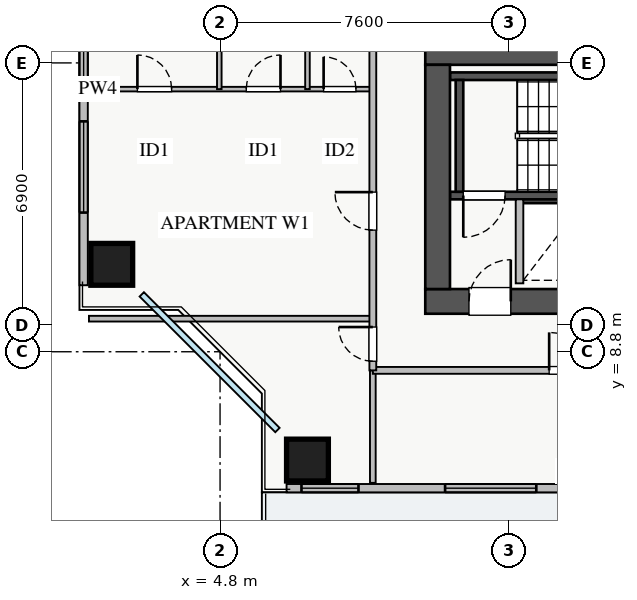
"""IFC4 building model, lengths in metres.
Left out: names, types, materials, properties, quantities, classifications, styles, units other than length and angle.
Written with IfcOpenShell. Run it as: python <this file> out.ifc"""

import sys

from ifc_helpers import new_model, si_unit, direction, frame, frame_2d, origin, origin_2d, place, context, subcontext, project, spatial, rectangle, extrude, source, transform, mapped, element, fill, save


model = new_model("IFC4")
c1 = context("Model", 3, precision=1e-05, world=origin(), true_north=direction((0.0, 1.0)))
c2 = subcontext(c1, "Body", "Model", "MODEL_VIEW")
j1 = project(units=[si_unit("LENGTHUNIT", "METRE"), si_unit("PLANEANGLEUNIT", "RADIAN")], contexts=[c1])
p1 = place(None, origin())
s1 = spatial("IfcSite", under=j1, at=p1, CompositionType="ELEMENT")
p2 = place(p1, origin())
s2 = spatial("IfcBuilding", under=s1, at=p2, CompositionType="ELEMENT")
p3 = place(p2, frame((0.0, 0.0, 97.0)))
s3 = spatial("IfcBuildingStorey", under=s2, at=p3, CompositionType="ELEMENT", Elevation=97.0)
p4 = place(p3, frame((12.68, 12.8, 0.0), z_axis=(0.0, 0.0, 1.0), x_axis=(1.0, 0.0, 0.0)))
e1 = element("IfcWall", 1, at=p4, inside=s3, PredefinedType="SHEAR", context=c2, shape_type="SweptSolid", body=[
    extrude(rectangle(XDim=1.94, YDim=0.18, at=frame_2d((0.97, 0.0))), origin(), (0.0, 0.0, 1.0), 3.07),
])
p5 = place(p3, frame((10.85, 12.91, 0.0), z_axis=(0.0, 0.0, 1.0), x_axis=(1.0, 0.0, 0.0)))
e2 = element("IfcWall", 2, at=p5, inside=s3, PredefinedType="SHEAR", context=c2, shape_type="SweptSolid", body=[
    extrude(rectangle(XDim=7.3, YDim=0.2, at=frame_2d((3.65, 0.0))), origin(), (0.0, 0.0, 1.0), 3.25),
])
p6 = place(p5, frame((0.35, 0.0, 0.0)))
e3 = element("IfcOpeningElement", 3, at=p6, cuts=e2, PredefinedType="OPENING", context=c2, shape_type="SweptSolid", body=[
    extrude(rectangle(XDim=1.1, YDim=2.05, at=frame_2d((0.55, 1.025))), frame((0.0, 0.11, 0.0), z_axis=(0.0, -1.0, 0.0), x_axis=(1.0, 0.0, 0.0)), (0.0, 0.0, 1.0), 0.22),
])
p7 = place(p3, frame((10.85, 16.05, 0.0), z_axis=(0.0, 0.0, 1.0), x_axis=(1.0, 0.0, 0.0)))
e4 = element("IfcWall", 4, at=p7, inside=s3, PredefinedType="SHEAR", context=c2, shape_type="SweptSolid", body=[
    extrude(rectangle(XDim=7.3, YDim=0.2, at=frame_2d((3.65, 0.0))), origin(), (0.0, 0.0, 1.0), 3.25),
])
p8 = place(p3, frame((11.1, 13.01, 0.0), z_axis=(0.0, 0.0, 1.0), x_axis=(0.0, 1.0, 0.0)))
e5 = element("IfcWall", 5, at=p8, inside=s3, PredefinedType="SHEAR", context=c2, shape_type="SweptSolid", body=[
    extrude(rectangle(XDim=2.94, YDim=0.2, at=frame_2d((1.47, 0.0))), origin(), (0.0, 0.0, 1.0), 3.25),
])
p9 = place(p3, frame((10.2, 10.125, 0.0), z_axis=(0.0, 0.0, 1.0), x_axis=(1.0, 0.0, 0.0)))
e6 = element("IfcWall", 6, at=p9, inside=s3, PredefinedType="SHEAR", context=c2, shape_type="SweptSolid", body=[
    extrude(rectangle(XDim=17.6, YDim=0.65, at=frame_2d((8.8, 0.0))), origin(), (0.0, 0.0, 1.0), 3.25),
])
p10 = place(p9, frame((1.15, 0.0, 0.0)))
e7 = element("IfcOpeningElement", 7, at=p10, cuts=e6, PredefinedType="OPENING", context=c2, shape_type="SweptSolid", body=[
    extrude(rectangle(XDim=1.1, YDim=2.05, at=frame_2d((0.55, 1.025))), frame((0.0, 0.335, 0.0), z_axis=(0.0, -1.0, 0.0), x_axis=(1.0, 0.0, 0.0)), (0.0, 0.0, 1.0), 0.67),
])
p11 = place(p9, frame((8.3, 0.0, 0.0)))
e8 = element("IfcOpeningElement", 8, at=p11, cuts=e6, PredefinedType="OPENING", context=c2, shape_type="SweptSolid", body=[
    extrude(rectangle(XDim=1.1, YDim=2.05, at=frame_2d((0.55, 1.025))), frame((0.0, 0.335, 0.0), z_axis=(0.0, -1.0, 0.0), x_axis=(1.0, 0.0, 0.0)), (0.0, 0.0, 1.0), 0.67),
])
p12 = place(p9, frame((4.9, 0.0, 0.0)))
e9 = element("IfcOpeningElement", 9, at=p12, cuts=e6, PredefinedType="OPENING", context=c2, shape_type="SweptSolid", body=[
    extrude(rectangle(XDim=1.1, YDim=2.05, at=frame_2d((0.55, 1.025))), frame((0.0, 0.335, 0.0), z_axis=(0.0, -1.0, 0.0), x_axis=(1.0, 0.0, 0.0)), (0.0, 0.0, 1.0), 0.67),
])
p13 = place(p9, frame((14.74, 0.0, 0.0)))
e10 = element("IfcOpeningElement", 10, at=p13, cuts=e6, PredefinedType="OPENING", context=c2, shape_type="SweptSolid", body=[
    extrude(rectangle(XDim=1.0, YDim=2.05, at=frame_2d((0.5, 1.025))), frame((0.0, 0.335, 0.0), z_axis=(0.0, -1.0, 0.0), x_axis=(1.0, 0.0, 0.0)), (0.0, 0.0, 1.0), 0.67),
])
p14 = place(p9, frame((11.67, 0.0, 0.0)))
e11 = element("IfcOpeningElement", 11, at=p14, cuts=e6, PredefinedType="OPENING", context=c2, shape_type="SweptSolid", body=[
    extrude(rectangle(XDim=1.0, YDim=2.05, at=frame_2d((0.5, 1.025))), frame((0.0, 0.335, 0.0), z_axis=(0.0, -1.0, 0.0), x_axis=(1.0, 0.0, 0.0)), (0.0, 0.0, 1.0), 0.67),
])
p15 = place(p3, frame((10.2, 16.675, 0.0), z_axis=(0.0, 0.0, 1.0), x_axis=(1.0, 0.0, 0.0)))
e12 = element("IfcWall", 12, at=p15, inside=s3, PredefinedType="SHEAR", context=c2, shape_type="SweptSolid", body=[
    extrude(rectangle(XDim=17.6, YDim=0.65, at=frame_2d((8.8, 0.0))), origin(), (0.0, 0.0, 1.0), 3.25),
])
p16 = place(p3, frame((10.525, 10.45, 0.0), z_axis=(0.0, 0.0, 1.0), x_axis=(0.0, 1.0, 0.0)))
e13 = element("IfcWall", 13, at=p16, inside=s3, PredefinedType="SHEAR", context=c2, shape_type="SweptSolid", body=[
    extrude(rectangle(XDim=5.9, YDim=0.65, at=frame_2d((2.95, 0.0))), origin(), (0.0, 0.0, 1.0), 3.25),
])
m1 = source(origin(), c2, "Body", "SweptSolid", [
    extrude(rectangle(XDim=1.1, YDim=1.1, at=origin_2d()), origin(), (0.0, 0.0, 1.0), 3.25),
])
for number, where, z_axis, x_axis in (
    (14, (7.1, 5.95, 0.0), (0.0, 0.0, 1.0), (1.0, 0.0, 0.0)),
    (15, (1.95, 11.1, 0.0), (0.0, 0.0, 1.0), (1.0, 0.0, 0.0)),
):
    element("IfcColumn", number, at=place(p3, frame(where, z_axis=z_axis, x_axis=x_axis)), inside=s3, PredefinedType="COLUMN", context=c2, shape_type="MappedRepresentation", body=[
        mapped(m1, transform((0.0, 0.0, 0.0), x_axis=(1.0, 0.0, 0.0), y_axis=(0.0, 1.0, 0.0), z_axis=(0.0, 0.0, 1.0), scale=1.0)),
    ])
p17 = place(p3, frame((6.55, 5.21, 0.0), z_axis=(0.0, 0.0, 1.0), x_axis=(1.0, 0.0, 0.0)))
e16 = element("IfcWall", 16, at=p17, inside=s3, PredefinedType="STANDARD", context=c2, shape_type="SweptSolid", body=[
    extrude(rectangle(XDim=24.9, YDim=0.22, at=frame_2d((12.45, 0.0))), origin(), (0.0, 0.0, 1.0), 2.61),
])
p18 = place(p17, frame((13.3, 0.0, 0.0)))
e17 = element("IfcOpeningElement", 17, at=p18, cuts=e16, PredefinedType="OPENING", context=c2, shape_type="SweptSolid", body=[
    extrude(rectangle(XDim=1.2, YDim=2.1, at=frame_2d((0.6, 1.05))), frame((0.0, 0.12, 0.0), z_axis=(0.0, -1.0, 0.0), x_axis=(1.0, 0.0, 0.0)), (0.0, 0.0, 1.0), 0.24),
])
p19 = place(p17, frame((0.393, 0.0, 0.9)))
e18 = element("IfcOpeningElement", 18, at=p19, cuts=e16, PredefinedType="OPENING", context=c2, shape_type="SweptSolid", body=[
    extrude(rectangle(XDim=1.5, YDim=1.5, at=frame_2d((0.75, 0.75))), frame((0.0, 0.12, 0.0), z_axis=(0.0, -1.0, 0.0), x_axis=(1.0, 0.0, 0.0)), (0.0, 0.0, 1.0), 0.24),
])
p20 = place(p17, frame((8.438, 0.0, 0.9)))
e19 = element("IfcOpeningElement", 19, at=p20, cuts=e16, PredefinedType="OPENING", context=c2, shape_type="SweptSolid", body=[
    extrude(rectangle(XDim=1.8, YDim=1.45, at=frame_2d((0.9, 0.725))), frame((0.0, 0.12, 0.0), z_axis=(0.0, -1.0, 0.0), x_axis=(1.0, 0.0, 0.0)), (0.0, 0.0, 1.0), 0.24),
])
p21 = place(p17, frame((14.813, 0.0, 0.9)))
e20 = element("IfcOpeningElement", 20, at=p21, cuts=e16, PredefinedType="OPENING", context=c2, shape_type="SweptSolid", body=[
    extrude(rectangle(XDim=1.5, YDim=1.45, at=frame_2d((0.75, 0.725))), frame((0.0, 0.12, 0.0), z_axis=(0.0, -1.0, 0.0), x_axis=(1.0, 0.0, 0.0)), (0.0, 0.0, 1.0), 0.24),
])
p22 = place(p17, frame((20.738, 0.0, 0.9)))
e21 = element("IfcOpeningElement", 21, at=p22, cuts=e16, PredefinedType="OPENING", context=c2, shape_type="SweptSolid", body=[
    extrude(rectangle(XDim=2.1, YDim=1.48, at=frame_2d((1.05, 0.74))), frame((0.0, 0.12, 0.0), z_axis=(0.0, -1.0, 0.0), x_axis=(1.0, 0.0, 0.0)), (0.0, 0.0, 1.0), 0.24),
])
p23 = place(p17, frame((4.171, 0.0, 0.9)))
e22 = element("IfcOpeningElement", 22, at=p23, cuts=e16, PredefinedType="OPENING", context=c2, shape_type="SweptSolid", body=[
    extrude(rectangle(XDim=2.4, YDim=1.5, at=frame_2d((1.2, 0.75))), frame((0.0, 0.12, 0.0), z_axis=(0.0, -1.0, 0.0), x_axis=(1.0, 0.0, 0.0)), (0.0, 0.0, 1.0), 0.24),
])
p24 = place(p3, frame((1.21, 10.55, 0.0), z_axis=(0.0, 0.0, 1.0), x_axis=(0.0, 1.0, 0.0)))
e23 = element("IfcWall", 23, at=p24, inside=s3, PredefinedType="STANDARD", context=c2, shape_type="SweptSolid", body=[
    extrude(rectangle(XDim=24.9, YDim=0.22, at=frame_2d((12.45, 0.0))), origin(), (0.0, 0.0, 1.0), 2.61),
])
p25 = place(p24, frame((13.3, 0.0, 0.0)))
e24 = element("IfcOpeningElement", 24, at=p25, cuts=e23, PredefinedType="OPENING", context=c2, shape_type="SweptSolid", body=[
    extrude(rectangle(XDim=1.2, YDim=2.1, at=frame_2d((0.6, 1.05))), frame((0.0, 0.12, 0.0), z_axis=(0.0, -1.0, 0.0), x_axis=(1.0, 0.0, 0.0)), (0.0, 0.0, 1.0), 0.24),
])
p26 = place(p24, frame((1.912, 0.0, 0.9)))
e25 = element("IfcOpeningElement", 25, at=p26, cuts=e23, PredefinedType="OPENING", context=c2, shape_type="SweptSolid", body=[
    extrude(rectangle(XDim=2.4, YDim=1.48, at=frame_2d((1.2, 0.74))), frame((0.0, 0.12, 0.0), z_axis=(0.0, -1.0, 0.0), x_axis=(1.0, 0.0, 0.0)), (0.0, 0.0, 1.0), 0.24),
])
p27 = place(p24, frame((20.737, 0.0, 0.9)))
e26 = element("IfcOpeningElement", 26, at=p27, cuts=e23, PredefinedType="OPENING", context=c2, shape_type="SweptSolid", body=[
    extrude(rectangle(XDim=2.1, YDim=1.48, at=frame_2d((1.05, 0.74))), frame((0.0, 0.12, 0.0), z_axis=(0.0, -1.0, 0.0), x_axis=(1.0, 0.0, 0.0)), (0.0, 0.0, 1.0), 0.24),
])
p28 = place(p24, frame((5.38, 0.0, 0.9)))
e27 = element("IfcOpeningElement", 27, at=p28, cuts=e23, PredefinedType="OPENING", context=c2, shape_type="SweptSolid", body=[
    extrude(rectangle(XDim=0.9, YDim=1.2, at=frame_2d((0.45, 0.6))), frame((0.0, 0.12, 0.0), z_axis=(0.0, -1.0, 0.0), x_axis=(1.0, 0.0, 0.0)), (0.0, 0.0, 1.0), 0.24),
])
p29 = place(p3, frame((12.68, 10.6, 0.0), z_axis=(0.0, 0.0, 1.0), x_axis=(0.0, 1.0, 0.0)))
e28 = element("IfcWall", 28, at=p29, inside=s3, PredefinedType="PARTITIONING", context=c2, shape_type="SweptSolid", body=[
    extrude(rectangle(XDim=2.21, YDim=0.2, at=frame_2d((1.105, 0.0))), origin(), (0.0, 0.0, 1.0), 3.07),
])
p30 = place(p3, frame((8.82, 5.35, 0.0), z_axis=(0.0, 0.0, 1.0), x_axis=(0.0, 1.0, 0.0)))
e29 = element("IfcWall", 29, at=p30, inside=s3, PredefinedType="PARTITIONING", context=c2, shape_type="SweptSolid", body=[
    extrude(rectangle(XDim=2.96, YDim=0.15, at=frame_2d((1.48, 0.0))), origin(), (0.0, 0.0, 1.0), 3.07),
])
p31 = place(p3, frame((8.82, 8.31, 0.0), z_axis=(0.0, 0.0, 1.0), x_axis=(1.0, 0.0, 0.0)))
e30 = element("IfcWall", 30, at=p31, inside=s3, PredefinedType="PARTITIONING", context=c2, shape_type="SweptSolid", body=[
    extrude(rectangle(XDim=23.58, YDim=0.18, at=frame_2d((11.79, 0.0))), origin(), (0.0, 0.0, 1.0), 3.07),
])
p32 = place(p31, frame((4.64, 0.0, 0.0)))
e31 = element("IfcOpeningElement", 31, at=p32, cuts=e30, PredefinedType="OPENING", context=c2, shape_type="SweptSolid", body=[
    extrude(rectangle(XDim=1.0, YDim=2.05, at=frame_2d((0.5, 1.025))), frame((0.0, 0.1, 0.0), z_axis=(0.0, -1.0, 0.0), x_axis=(1.0, 0.0, 0.0)), (0.0, 0.0, 1.0), 0.2),
])
p33 = place(p31, frame((16.22, 0.0, 0.0)))
e32 = element("IfcOpeningElement", 32, at=p33, cuts=e30, PredefinedType="OPENING", context=c2, shape_type="SweptSolid", body=[
    extrude(rectangle(XDim=1.0, YDim=2.05, at=frame_2d((0.5, 1.025))), frame((0.0, 0.1, 0.0), z_axis=(0.0, -1.0, 0.0), x_axis=(1.0, 0.0, 0.0)), (0.0, 0.0, 1.0), 0.2),
])
p34 = place(p3, frame((1.35, 9.67, 0.0), z_axis=(0.0, 0.0, 1.0), x_axis=(1.0, 0.0, 0.0)))
e33 = element("IfcWall", 33, at=p34, inside=s3, PredefinedType="PARTITIONING", context=c2, shape_type="SweptSolid", body=[
    extrude(rectangle(XDim=7.47, YDim=0.15, at=frame_2d((3.735, 0.0))), origin(), (0.0, 0.0, 1.0), 3.07),
])
p35 = place(p3, frame((1.35, 15.71, 0.0), z_axis=(0.0, 0.0, 1.0), x_axis=(1.0, 0.0, 0.0)))
e34 = element("IfcWall", 34, at=p35, inside=s3, PredefinedType="PLUMBINGWALL", context=c2, shape_type="SweptSolid", body=[
    extrude(rectangle(XDim=7.47, YDim=0.12, at=frame_2d((3.735, 0.0))), origin(), (0.0, 0.0, 1.0), 3.07),
])
p36 = place(p35, frame((1.275, 0.0, 0.0)))
e35 = element("IfcOpeningElement", 35, at=p36, cuts=e34, PredefinedType="OPENING", context=c2, shape_type="SweptSolid", body=[
    extrude(rectangle(XDim=0.9, YDim=2.05, at=frame_2d((0.45, 1.025))), frame((0.0, 0.07, 0.0), z_axis=(0.0, -1.0, 0.0), x_axis=(1.0, 0.0, 0.0)), (0.0, 0.0, 1.0), 0.14),
])
p37 = place(p35, frame((4.14, 0.0, 0.0)))
e36 = element("IfcOpeningElement", 36, at=p37, cuts=e34, PredefinedType="OPENING", context=c2, shape_type="SweptSolid", body=[
    extrude(rectangle(XDim=0.9, YDim=2.05, at=frame_2d((0.45, 1.025))), frame((0.0, 0.07, 0.0), z_axis=(0.0, -1.0, 0.0), x_axis=(1.0, 0.0, 0.0)), (0.0, 0.0, 1.0), 0.14),
])
p38 = place(p35, frame((6.175, 0.0, 0.0)))
e37 = element("IfcOpeningElement", 37, at=p38, cuts=e34, PredefinedType="OPENING", context=c2, shape_type="SweptSolid", body=[
    extrude(rectangle(XDim=0.85, YDim=2.05, at=frame_2d((0.425, 1.025))), frame((0.0, 0.07, 0.0), z_axis=(0.0, -1.0, 0.0), x_axis=(1.0, 0.0, 0.0)), (0.0, 0.0, 1.0), 0.14),
])
for number, where, z_axis, x_axis in (
    (38, (4.78, 15.71, 0.0), (0.0, 0.0, 1.0), (0.0, 1.0, 0.0)),
    (39, (7.1, 15.71, 0.0), (0.0, 0.0, 1.0), (0.0, 1.0, 0.0)),
):
    element("IfcWall", number, at=place(p3, frame(where, z_axis=z_axis, x_axis=x_axis)), inside=s3, PredefinedType="PLUMBINGWALL", context=c2, shape_type="SweptSolid", body=[
        extrude(rectangle(XDim=6.54, YDim=0.12, at=frame_2d((3.27, 0.0))), origin(), (0.0, 0.0, 1.0), 3.07),
    ])
p39 = place(p3, frame((8.82, 8.31, 0.0), z_axis=(0.0, 0.0, 1.0), x_axis=(0.0, 1.0, 0.0)))
e40 = element("IfcWall", 40, at=p39, inside=s3, PredefinedType="PARTITIONING", context=c2, shape_type="SweptSolid", body=[
    extrude(rectangle(XDim=29.13, YDim=0.18, at=frame_2d((14.565, 0.0))), origin(), (0.0, 0.0, 1.0), 3.07),
])
p40 = place(p39, frame((27.94, 0.0, 0.0)))
e41 = element("IfcOpeningElement", 41, at=p40, cuts=e40, PredefinedType="OPENING", context=c2, shape_type="SweptSolid", body=[
    extrude(rectangle(XDim=0.9, YDim=2.05, at=frame_2d((0.45, 1.025))), frame((0.0, 0.1, 0.0), z_axis=(0.0, -1.0, 0.0), x_axis=(1.0, 0.0, 0.0)), (0.0, 0.0, 1.0), 0.2),
])
p41 = place(p39, frame((0.24, 0.0, 0.0)))
e42 = element("IfcOpeningElement", 42, at=p41, cuts=e40, PredefinedType="OPENING", context=c2, shape_type="SweptSolid", body=[
    extrude(rectangle(XDim=0.9, YDim=2.05, at=frame_2d((0.45, 1.025))), frame((0.0, 0.1, 0.0), z_axis=(0.0, -1.0, 0.0), x_axis=(1.0, 0.0, 0.0)), (0.0, 0.0, 1.0), 0.2),
])
p42 = place(p39, frame((3.69, 0.0, 0.0)))
e43 = element("IfcOpeningElement", 43, at=p42, cuts=e40, PredefinedType="OPENING", context=c2, shape_type="SweptSolid", body=[
    extrude(rectangle(XDim=1.0, YDim=2.05, at=frame_2d((0.5, 1.025))), frame((0.0, 0.1, 0.0), z_axis=(0.0, -1.0, 0.0), x_axis=(1.0, 0.0, 0.0)), (0.0, 0.0, 1.0), 0.2),
])
p43 = place(p39, frame((20.305, 0.0, 0.0)))
e44 = element("IfcOpeningElement", 44, at=p43, cuts=e40, PredefinedType="OPENING", context=c2, shape_type="SweptSolid", body=[
    extrude(rectangle(XDim=1.0, YDim=2.05, at=frame_2d((0.5, 1.025))), frame((0.0, 0.1, 0.0), z_axis=(0.0, -1.0, 0.0), x_axis=(1.0, 0.0, 0.0)), (0.0, 0.0, 1.0), 0.2),
])
m2 = source(origin(), c2, "Body", "SweptSolid", [
    extrude(rectangle(XDim=1.5, YDim=1.5, at=frame_2d((0.75, 0.75))), frame((0.0, 0.03, 0.0), z_axis=(0.0, -1.0, 0.0), x_axis=(1.0, 0.0, 0.0)), (0.0, 0.0, 1.0), 0.06),
])
p44 = place(p19, origin())
e45 = element("IfcWindow", 45, at=p44, inside=s3, PartitioningType="TRIPLE_PANEL_VERTICAL", PredefinedType="WINDOW", context=c2, shape_type="MappedRepresentation", body=[
    mapped(m2, transform((0.0, 0.0, 0.0), x_axis=(1.0, 0.0, 0.0), y_axis=(0.0, 1.0, 0.0), z_axis=(0.0, 0.0, 1.0), scale=1.0)),
])
fill(e18, e45)
m3 = source(origin(), c2, "Body", "SweptSolid", [
    extrude(rectangle(XDim=2.4, YDim=1.48, at=frame_2d((1.2, 0.74))), frame((0.0, 0.03, 0.0), z_axis=(0.0, -1.0, 0.0), x_axis=(1.0, 0.0, 0.0)), (0.0, 0.0, 1.0), 0.06),
])
p45 = place(p26, origin())
e46 = element("IfcWindow", 46, at=p45, inside=s3, PartitioningType="TRIPLE_PANEL_VERTICAL", PredefinedType="WINDOW", context=c2, shape_type="MappedRepresentation", body=[
    mapped(m3, transform((0.0, 0.0, 0.0), x_axis=(1.0, 0.0, 0.0), y_axis=(0.0, 1.0, 0.0), z_axis=(0.0, 0.0, 1.0), scale=1.0)),
])
fill(e25, e46)
m4 = source(origin(), c2, "Body", "SweptSolid", [
    extrude(rectangle(XDim=1.1, YDim=2.05, at=frame_2d((0.55, 1.025))), frame((0.0, 0.025, 0.0), z_axis=(0.0, -1.0, 0.0), x_axis=(1.0, 0.0, 0.0)), (0.0, 0.0, 1.0), 0.05),
])
p46 = place(p10, origin())
e47 = element("IfcDoor", 47, at=p46, inside=s3, OperationType="SINGLE_SWING_RIGHT", PredefinedType="DOOR", context=c2, shape_type="MappedRepresentation", body=[
    mapped(m4, transform((0.0, 0.0, 0.0), x_axis=(1.0, 0.0, 0.0), y_axis=(0.0, 1.0, 0.0), z_axis=(0.0, 0.0, 1.0), scale=1.0)),
])
fill(e7, e47)
p47 = place(p6, frame((1.1, 0.0, 0.0), z_axis=(0.0, 0.0, 1.0), x_axis=(-1.0, 0.0, 0.0)))
e48 = element("IfcDoor", 48, at=p47, inside=s3, OperationType="SINGLE_SWING_LEFT", PredefinedType="DOOR", context=c2, shape_type="MappedRepresentation", body=[
    mapped(m4, transform((0.0, 0.0, 0.0), x_axis=(1.0, 0.0, 0.0), y_axis=(0.0, 1.0, 0.0), z_axis=(0.0, 0.0, 1.0), scale=1.0)),
])
fill(e3, e48)
m5 = source(origin(), c2, "Body", "SweptSolid", [
    extrude(rectangle(XDim=1.0, YDim=2.05, at=frame_2d((0.5, 1.025))), frame((0.0, 0.025, 0.0), z_axis=(0.0, -1.0, 0.0), x_axis=(1.0, 0.0, 0.0)), (0.0, 0.0, 1.0), 0.05),
])
p48 = place(p32, origin())
e49 = element("IfcDoor", 49, at=p48, inside=s3, OperationType="SINGLE_SWING_LEFT", PredefinedType="DOOR", context=c2, shape_type="MappedRepresentation", body=[
    mapped(m5, transform((0.0, 0.0, 0.0), x_axis=(1.0, 0.0, 0.0), y_axis=(0.0, 1.0, 0.0), z_axis=(0.0, 0.0, 1.0), scale=1.0)),
])
fill(e31, e49)
m6 = source(origin(), c2, "Body", "SweptSolid", [
    extrude(rectangle(XDim=0.9, YDim=2.05, at=frame_2d((0.45, 1.025))), frame((0.0, 0.025, 0.0), z_axis=(0.0, -1.0, 0.0), x_axis=(1.0, 0.0, 0.0)), (0.0, 0.0, 1.0), 0.05),
])
p49 = place(p36, origin())
e50 = element("IfcDoor", 50, at=p49, inside=s3, OperationType="SINGLE_SWING_LEFT", PredefinedType="DOOR", context=c2, shape_type="MappedRepresentation", body=[
    mapped(m6, transform((0.0, 0.0, 0.0), x_axis=(1.0, 0.0, 0.0), y_axis=(0.0, 1.0, 0.0), z_axis=(0.0, 0.0, 1.0), scale=1.0)),
])
fill(e35, e50)
p50 = place(p37, origin())
e51 = element("IfcDoor", 51, at=p50, inside=s3, OperationType="SINGLE_SWING_RIGHT", PredefinedType="DOOR", context=c2, shape_type="MappedRepresentation", body=[
    mapped(m6, transform((0.0, 0.0, 0.0), x_axis=(1.0, 0.0, 0.0), y_axis=(0.0, 1.0, 0.0), z_axis=(0.0, 0.0, 1.0), scale=1.0)),
])
fill(e36, e51)
m7 = source(origin(), c2, "Body", "SweptSolid", [
    extrude(rectangle(XDim=0.85, YDim=2.05, at=frame_2d((0.425, 1.025))), frame((0.0, 0.025, 0.0), z_axis=(0.0, -1.0, 0.0), x_axis=(1.0, 0.0, 0.0)), (0.0, 0.0, 1.0), 0.05),
])
p51 = place(p38, origin())
e52 = element("IfcDoor", 52, at=p51, inside=s3, OperationType="SINGLE_SWING_LEFT", PredefinedType="DOOR", context=c2, shape_type="MappedRepresentation", body=[
    mapped(m7, transform((0.0, 0.0, 0.0), x_axis=(1.0, 0.0, 0.0), y_axis=(0.0, 1.0, 0.0), z_axis=(0.0, 0.0, 1.0), scale=1.0)),
])
fill(e37, e52)
p52 = place(p41, origin())
e53 = element("IfcDoor", 53, at=p52, inside=s3, OperationType="SINGLE_SWING_RIGHT", PredefinedType="DOOR", context=c2, shape_type="MappedRepresentation", body=[
    mapped(m6, transform((0.0, 0.0, 0.0), x_axis=(1.0, 0.0, 0.0), y_axis=(0.0, 1.0, 0.0), z_axis=(0.0, 0.0, 1.0), scale=1.0)),
])
fill(e42, e53)
p53 = place(p42, origin())
e54 = element("IfcDoor", 54, at=p53, inside=s3, OperationType="SINGLE_SWING_RIGHT", PredefinedType="DOOR", context=c2, shape_type="MappedRepresentation", body=[
    mapped(m5, transform((0.0, 0.0, 0.0), x_axis=(1.0, 0.0, 0.0), y_axis=(0.0, 1.0, 0.0), z_axis=(0.0, 0.0, 1.0), scale=1.0)),
])
fill(e43, e54)
m8 = source(origin(), c2, "Body", "SweptSolid", [
    extrude(rectangle(XDim=2.4, YDim=1.5, at=frame_2d((1.2, 0.75))), frame((0.0, 0.03, 0.0), z_axis=(0.0, -1.0, 0.0), x_axis=(1.0, 0.0, 0.0)), (0.0, 0.0, 1.0), 0.06),
])
p54 = place(p23, origin())
e55 = element("IfcWindow", 55, at=p54, inside=s3, PartitioningType="TRIPLE_PANEL_VERTICAL", PredefinedType="WINDOW", context=c2, shape_type="MappedRepresentation", body=[
    mapped(m8, transform((0.0, 0.0, 0.0), x_axis=(1.0, 0.0, 0.0), y_axis=(0.0, 1.0, 0.0), z_axis=(0.0, 0.0, 1.0), scale=1.0)),
])
fill(e22, e55)
m9 = source(origin(), c2, "Body", "SweptSolid", [
    extrude(rectangle(XDim=0.9, YDim=1.2, at=frame_2d((0.45, 0.6))), frame((0.0, 0.03, 0.0), z_axis=(0.0, -1.0, 0.0), x_axis=(1.0, 0.0, 0.0)), (0.0, 0.0, 1.0), 0.06),
])
p55 = place(p28, origin())
e56 = element("IfcWindow", 56, at=p55, inside=s3, PartitioningType="SINGLE_PANEL", PredefinedType="WINDOW", context=c2, shape_type="MappedRepresentation", body=[
    mapped(m9, transform((0.0, 0.0, 0.0), x_axis=(1.0, 0.0, 0.0), y_axis=(0.0, 1.0, 0.0), z_axis=(0.0, 0.0, 1.0), scale=1.0)),
])
fill(e27, e56)
save(model, sys.argv[1])
